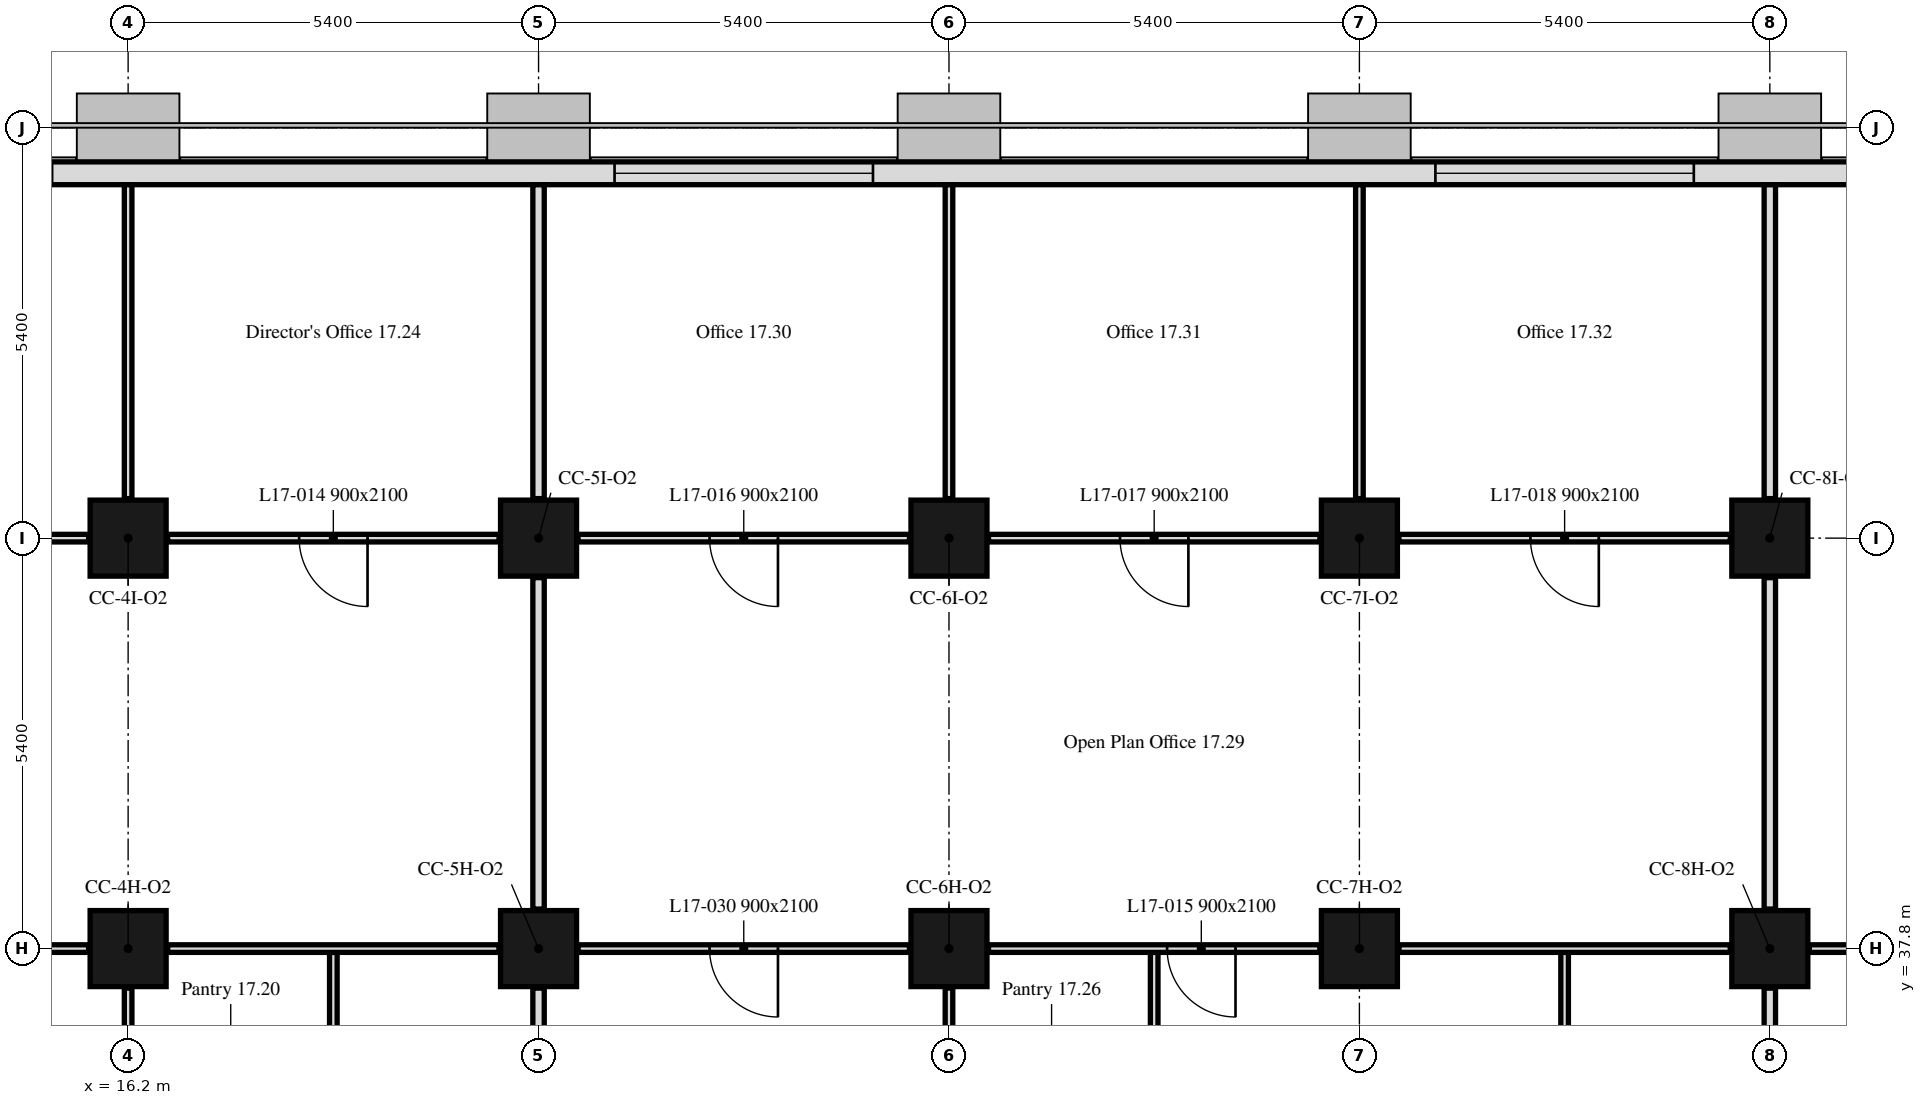
"""IFC4 building model, lengths in metres.
Left out: names, types, materials, properties, quantities, classifications, styles, units other than length and angle.
Written with IfcOpenShell. Run it as: python <this file> out.ifc"""

import sys

from ifc_helpers import new_model, si_unit, direction, frame, frame_2d, origin, origin_2d, place, context, subcontext, project, spatial, rectangle, extrude, element, fill, save


model = new_model("IFC4")
c1 = context("Model", 3, precision=1e-05, world=origin(), true_north=direction((0.0, 1.0)))
c2 = subcontext(c1, "Body", "Model", "MODEL_VIEW")
j1 = project(units=[si_unit("LENGTHUNIT", "METRE"), si_unit("PLANEANGLEUNIT", "RADIAN")], contexts=[c1])
p1 = place(None, origin())
s1 = spatial("IfcSite", under=j1, at=p1, CompositionType="ELEMENT")
p2 = place(p1, origin())
s2 = spatial("IfcBuilding", under=s1, at=p2, CompositionType="ELEMENT")
p3 = place(p2, frame((0.0, 0.0, 76.4)))
s3 = spatial("IfcBuildingStorey", under=s2, at=p3, CompositionType="ELEMENT", Elevation=76.4)
for number, where, z_axis, x_axis in (
    (1, (16.2, 37.8, 0.0), (0.0, 0.0, 1.0), (1.0, 0.0, 0.0)),
    (2, (21.6, 37.8, 0.0), (0.0, 0.0, 1.0), (1.0, 0.0, 0.0)),
    (3, (27.0, 37.8, 0.0), (0.0, 0.0, 1.0), (1.0, 0.0, 0.0)),
    (4, (32.4, 37.8, 0.0), (0.0, 0.0, 1.0), (1.0, 0.0, 0.0)),
    (5, (37.8, 37.8, 0.0), (0.0, 0.0, 1.0), (1.0, 0.0, 0.0)),
    (6, (16.2, 43.2, 0.0), (0.0, 0.0, 1.0), (1.0, 0.0, 0.0)),
    (7, (21.6, 43.2, 0.0), (0.0, 0.0, 1.0), (1.0, 0.0, 0.0)),
    (8, (27.0, 43.2, 0.0), (0.0, 0.0, 1.0), (1.0, 0.0, 0.0)),
    (9, (32.4, 43.2, 0.0), (0.0, 0.0, 1.0), (1.0, 0.0, 0.0)),
    (10, (37.8, 43.2, 0.0), (0.0, 0.0, 1.0), (1.0, 0.0, 0.0)),
):
    element("IfcColumn", number, at=place(p3, frame(where, z_axis=z_axis, x_axis=x_axis)), inside=s3, PredefinedType="COLUMN", context=c2, shape_type="SweptSolid", body=[
        extrude(rectangle(XDim=1.0, YDim=1.0, at=origin_2d()), origin(), (0.0, 0.0, 1.0), 3.5),
    ])
p4 = place(p3, frame((43.014, 48.0, 0.0), z_axis=(0.0, 0.0, 1.0), x_axis=(-1.0, 0.0, 0.0)))
e11 = element("IfcWall", 11, at=p4, inside=s3, PredefinedType="SOLIDWALL", context=c2, shape_type="SweptSolid", body=[
    extrude(rectangle(XDim=32.027, YDim=0.3, at=frame_2d((16.014, 0.0))), origin(), (0.0, 0.0, 1.0), 3.5),
])
p5 = place(p4, frame((6.214, 0.0, 0.9)))
e12 = element("IfcOpeningElement", 12, at=p5, cuts=e11, PredefinedType="OPENING", context=c2, shape_type="SweptSolid", body=[
    extrude(rectangle(XDim=3.4, YDim=1.7, at=frame_2d((1.7, 0.85))), frame((0.0, 0.16, 0.0), z_axis=(0.0, -1.0, 0.0), x_axis=(1.0, 0.0, 0.0)), (0.0, 0.0, 1.0), 0.32),
])
p6 = place(p4, frame((17.014, 0.0, 0.9)))
e13 = element("IfcOpeningElement", 13, at=p6, cuts=e11, PredefinedType="OPENING", context=c2, shape_type="SweptSolid", body=[
    extrude(rectangle(XDim=3.4, YDim=1.7, at=frame_2d((1.7, 0.85))), frame((0.0, 0.16, 0.0), z_axis=(0.0, -1.0, 0.0), x_axis=(1.0, 0.0, 0.0)), (0.0, 0.0, 1.0), 0.32),
])
p7 = place(p4, frame((27.814, 0.0, 0.9)))
e14 = element("IfcOpeningElement", 14, at=p7, cuts=e11, PredefinedType="OPENING", context=c2, shape_type="SweptSolid", body=[
    extrude(rectangle(XDim=3.4, YDim=1.7, at=frame_2d((1.7, 0.85))), frame((0.0, 0.16, 0.0), z_axis=(0.0, -1.0, 0.0), x_axis=(1.0, 0.0, 0.0)), (0.0, 0.0, 1.0), 0.32),
])
p8 = place(p3, frame((16.2, 35.175, 0.0), z_axis=(0.0, 0.0, 1.0), x_axis=(0.0, 1.0, 0.0)))
e15 = element("IfcWall", 15, at=p8, inside=s3, PredefinedType="PARTITIONING", context=c2, shape_type="SweptSolid", body=[
    extrude(rectangle(XDim=2.105, YDim=0.1, at=frame_2d((1.052, 0.0))), origin(), (0.0, 0.0, 1.0), 2.75),
])
p9 = place(p3, frame((15.68, 37.8, 0.0), z_axis=(0.0, 0.0, 1.0), x_axis=(-1.0, 0.0, 0.0)))
e16 = element("IfcWall", 16, at=p9, inside=s3, PredefinedType="PARTITIONING", context=c2, shape_type="SweptSolid", body=[
    extrude(rectangle(XDim=4.36, YDim=0.1, at=frame_2d((2.18, 0.0))), origin(), (0.0, 0.0, 1.0), 3.5),
])
p10 = place(p9, frame((1.73, 0.0, 0.0)))
e17 = element("IfcOpeningElement", 17, at=p10, cuts=e16, PredefinedType="OPENING", context=c2, shape_type="SweptSolid", body=[
    extrude(rectangle(XDim=0.9, YDim=2.1, at=frame_2d((0.45, 1.05))), frame((0.0, 0.05, 0.0), z_axis=(0.0, -1.0, 0.0), x_axis=(1.0, 0.0, 0.0)), (0.0, 0.0, 1.0), 0.1),
])
p11 = place(p3, frame((18.9, 35.175, 0.0), z_axis=(0.0, 0.0, 1.0), x_axis=(0.0, 1.0, 0.0)))
e18 = element("IfcWall", 18, at=p11, inside=s3, PredefinedType="PARTITIONING", context=c2, shape_type="SweptSolid", body=[
    extrude(rectangle(XDim=2.575, YDim=0.1, at=frame_2d((1.288, 0.0))), origin(), (0.0, 0.0, 1.0), 3.5),
])
p12 = place(p3, frame((21.6, 35.175, 0.0), z_axis=(0.0, 0.0, 1.0), x_axis=(0.0, 1.0, 0.0)))
e19 = element("IfcWall", 19, at=p12, inside=s3, PredefinedType="PARTITIONING", context=c2, shape_type="SweptSolid", body=[
    extrude(rectangle(XDim=2.105, YDim=0.15, at=frame_2d((1.052, 0.0))), origin(), (0.0, 0.0, 1.0), 2.75),
])
p13 = place(p3, frame((21.08, 37.8, 0.0), z_axis=(0.0, 0.0, 1.0), x_axis=(-1.0, 0.0, 0.0)))
e20 = element("IfcWall", 20, at=p13, inside=s3, PredefinedType="PARTITIONING", context=c2, shape_type="SweptSolid", body=[
    extrude(rectangle(XDim=4.36, YDim=0.1, at=frame_2d((2.18, 0.0))), origin(), (0.0, 0.0, 1.0), 3.5),
])
p14 = place(p3, frame((21.08, 43.2, 0.0), z_axis=(0.0, 0.0, 1.0), x_axis=(-1.0, 0.0, 0.0)))
e21 = element("IfcWall", 21, at=p14, inside=s3, PredefinedType="PARTITIONING", context=c2, shape_type="SweptSolid", body=[
    extrude(rectangle(XDim=4.36, YDim=0.1, at=frame_2d((2.18, 0.0))), origin(), (0.0, 0.0, 1.0), 3.5),
])
p15 = place(p14, frame((1.73, 0.0, 0.0)))
e22 = element("IfcOpeningElement", 22, at=p15, cuts=e21, PredefinedType="OPENING", context=c2, shape_type="SweptSolid", body=[
    extrude(rectangle(XDim=0.9, YDim=2.1, at=frame_2d((0.45, 1.05))), frame((0.0, 0.05, 0.0), z_axis=(0.0, -1.0, 0.0), x_axis=(1.0, 0.0, 0.0)), (0.0, 0.0, 1.0), 0.1),
])
p16 = place(p3, frame((15.68, 43.2, 0.0), z_axis=(0.0, 0.0, 1.0), x_axis=(-1.0, 0.0, 0.0)))
e23 = element("IfcWall", 23, at=p16, inside=s3, PredefinedType="PARTITIONING", context=c2, shape_type="SweptSolid", body=[
    extrude(rectangle(XDim=4.36, YDim=0.1, at=frame_2d((2.18, 0.0))), origin(), (0.0, 0.0, 1.0), 3.5),
])
p17 = place(p16, frame((1.73, 0.0, 0.0)))
e24 = element("IfcOpeningElement", 24, at=p17, cuts=e23, PredefinedType="OPENING", context=c2, shape_type="SweptSolid", body=[
    extrude(rectangle(XDim=0.9, YDim=2.1, at=frame_2d((0.45, 1.05))), frame((0.0, 0.05, 0.0), z_axis=(0.0, -1.0, 0.0), x_axis=(1.0, 0.0, 0.0)), (0.0, 0.0, 1.0), 0.1),
])
p18 = place(p3, frame((21.6, 38.32, 0.0), z_axis=(0.0, 0.0, 1.0), x_axis=(0.0, 1.0, 0.0)))
e25 = element("IfcWall", 25, at=p18, inside=s3, PredefinedType="PARTITIONING", context=c2, shape_type="SweptSolid", body=[
    extrude(rectangle(XDim=4.36, YDim=0.15, at=frame_2d((2.18, 0.0))), origin(), (0.0, 0.0, 1.0), 2.75),
])
p19 = place(p3, frame((16.2, 43.72, 0.0), z_axis=(0.0, 0.0, 1.0), x_axis=(0.0, 1.0, 0.0)))
e26 = element("IfcWall", 26, at=p19, inside=s3, PredefinedType="PARTITIONING", context=c2, shape_type="SweptSolid", body=[
    extrude(rectangle(XDim=4.129, YDim=0.1, at=frame_2d((2.064, 0.0))), origin(), (0.0, 0.0, 1.0), 2.75),
])
p20 = place(p3, frame((21.6, 43.72, 0.0), z_axis=(0.0, 0.0, 1.0), x_axis=(0.0, 1.0, 0.0)))
e27 = element("IfcWall", 27, at=p20, inside=s3, PredefinedType="PARTITIONING", context=c2, shape_type="SweptSolid", body=[
    extrude(rectangle(XDim=4.129, YDim=0.15, at=frame_2d((2.064, 0.0))), origin(), (0.0, 0.0, 1.0), 2.75),
])
p21 = place(p3, frame((27.0, 35.175, 0.0), z_axis=(0.0, 0.0, 1.0), x_axis=(0.0, 1.0, 0.0)))
e28 = element("IfcWall", 28, at=p21, inside=s3, PredefinedType="PARTITIONING", context=c2, shape_type="SweptSolid", body=[
    extrude(rectangle(XDim=2.105, YDim=0.1, at=frame_2d((1.052, 0.0))), origin(), (0.0, 0.0, 1.0), 2.75),
])
p22 = place(p3, frame((26.48, 37.8, 0.0), z_axis=(0.0, 0.0, 1.0), x_axis=(-1.0, 0.0, 0.0)))
e29 = element("IfcWall", 29, at=p22, inside=s3, PredefinedType="PARTITIONING", context=c2, shape_type="SweptSolid", body=[
    extrude(rectangle(XDim=4.36, YDim=0.1, at=frame_2d((2.18, 0.0))), origin(), (0.0, 0.0, 1.0), 3.5),
])
p23 = place(p22, frame((1.73, 0.0, 0.0)))
e30 = element("IfcOpeningElement", 30, at=p23, cuts=e29, PredefinedType="OPENING", context=c2, shape_type="SweptSolid", body=[
    extrude(rectangle(XDim=0.9, YDim=2.1, at=frame_2d((0.45, 1.05))), frame((0.0, 0.05, 0.0), z_axis=(0.0, -1.0, 0.0), x_axis=(1.0, 0.0, 0.0)), (0.0, 0.0, 1.0), 0.1),
])
for number, where, z_axis, x_axis in (
    (31, (29.7, 35.175, 0.0), (0.0, 0.0, 1.0), (0.0, 1.0, 0.0)),
    (32, (35.1, 35.175, 0.0), (0.0, 0.0, 1.0), (0.0, 1.0, 0.0)),
):
    element("IfcWall", number, at=place(p3, frame(where, z_axis=z_axis, x_axis=x_axis)), inside=s3, PredefinedType="PARTITIONING", context=c2, shape_type="SweptSolid", body=[
        extrude(rectangle(XDim=2.575, YDim=0.1, at=frame_2d((1.288, 0.0))), origin(), (0.0, 0.0, 1.0), 3.5),
    ])
p24 = place(p3, frame((31.88, 37.8, 0.0), z_axis=(0.0, 0.0, 1.0), x_axis=(-1.0, 0.0, 0.0)))
e33 = element("IfcWall", 33, at=p24, inside=s3, PredefinedType="PARTITIONING", context=c2, shape_type="SweptSolid", body=[
    extrude(rectangle(XDim=4.36, YDim=0.1, at=frame_2d((2.18, 0.0))), origin(), (0.0, 0.0, 1.0), 3.5),
])
p25 = place(p24, frame((1.11, 0.0, 0.0)))
e34 = element("IfcOpeningElement", 34, at=p25, cuts=e33, PredefinedType="OPENING", context=c2, shape_type="SweptSolid", body=[
    extrude(rectangle(XDim=0.9, YDim=2.1, at=frame_2d((0.45, 1.05))), frame((0.0, 0.05, 0.0), z_axis=(0.0, -1.0, 0.0), x_axis=(1.0, 0.0, 0.0)), (0.0, 0.0, 1.0), 0.1),
])
p26 = place(p3, frame((37.8, 35.175, 0.0), z_axis=(0.0, 0.0, 1.0), x_axis=(0.0, 1.0, 0.0)))
e35 = element("IfcWall", 35, at=p26, inside=s3, PredefinedType="PARTITIONING", context=c2, shape_type="SweptSolid", body=[
    extrude(rectangle(XDim=2.105, YDim=0.15, at=frame_2d((1.052, 0.0))), origin(), (0.0, 0.0, 1.0), 2.75),
])
p27 = place(p3, frame((37.28, 37.8, 0.0), z_axis=(0.0, 0.0, 1.0), x_axis=(-1.0, 0.0, 0.0)))
e36 = element("IfcWall", 36, at=p27, inside=s3, PredefinedType="PARTITIONING", context=c2, shape_type="SweptSolid", body=[
    extrude(rectangle(XDim=4.36, YDim=0.1, at=frame_2d((2.18, 0.0))), origin(), (0.0, 0.0, 1.0), 2.75),
])
p28 = place(p3, frame((37.8, 38.32, 0.0), z_axis=(0.0, 0.0, 1.0), x_axis=(0.0, 1.0, 0.0)))
e37 = element("IfcWall", 37, at=p28, inside=s3, PredefinedType="PARTITIONING", context=c2, shape_type="SweptSolid", body=[
    extrude(rectangle(XDim=4.36, YDim=0.15, at=frame_2d((2.18, 0.0))), origin(), (0.0, 0.0, 1.0), 2.75),
])
p29 = place(p3, frame((37.28, 43.2, 0.0), z_axis=(0.0, 0.0, 1.0), x_axis=(-1.0, 0.0, 0.0)))
e38 = element("IfcWall", 38, at=p29, inside=s3, PredefinedType="PARTITIONING", context=c2, shape_type="SweptSolid", body=[
    extrude(rectangle(XDim=4.36, YDim=0.1, at=frame_2d((2.18, 0.0))), origin(), (0.0, 0.0, 1.0), 3.5),
])
p30 = place(p29, frame((1.73, 0.0, 0.0)))
e39 = element("IfcOpeningElement", 39, at=p30, cuts=e38, PredefinedType="OPENING", context=c2, shape_type="SweptSolid", body=[
    extrude(rectangle(XDim=0.9, YDim=2.1, at=frame_2d((0.45, 1.05))), frame((0.0, 0.05, 0.0), z_axis=(0.0, -1.0, 0.0), x_axis=(1.0, 0.0, 0.0)), (0.0, 0.0, 1.0), 0.1),
])
p31 = place(p3, frame((31.88, 43.2, 0.0), z_axis=(0.0, 0.0, 1.0), x_axis=(-1.0, 0.0, 0.0)))
e40 = element("IfcWall", 40, at=p31, inside=s3, PredefinedType="PARTITIONING", context=c2, shape_type="SweptSolid", body=[
    extrude(rectangle(XDim=4.36, YDim=0.1, at=frame_2d((2.18, 0.0))), origin(), (0.0, 0.0, 1.0), 3.5),
])
p32 = place(p31, frame((1.73, 0.0, 0.0)))
e41 = element("IfcOpeningElement", 41, at=p32, cuts=e40, PredefinedType="OPENING", context=c2, shape_type="SweptSolid", body=[
    extrude(rectangle(XDim=0.9, YDim=2.1, at=frame_2d((0.45, 1.05))), frame((0.0, 0.05, 0.0), z_axis=(0.0, -1.0, 0.0), x_axis=(1.0, 0.0, 0.0)), (0.0, 0.0, 1.0), 0.1),
])
p33 = place(p3, frame((26.48, 43.2, 0.0), z_axis=(0.0, 0.0, 1.0), x_axis=(-1.0, 0.0, 0.0)))
e42 = element("IfcWall", 42, at=p33, inside=s3, PredefinedType="PARTITIONING", context=c2, shape_type="SweptSolid", body=[
    extrude(rectangle(XDim=4.36, YDim=0.1, at=frame_2d((2.18, 0.0))), origin(), (0.0, 0.0, 1.0), 3.5),
])
p34 = place(p33, frame((1.73, 0.0, 0.0)))
e43 = element("IfcOpeningElement", 43, at=p34, cuts=e42, PredefinedType="OPENING", context=c2, shape_type="SweptSolid", body=[
    extrude(rectangle(XDim=0.9, YDim=2.1, at=frame_2d((0.45, 1.05))), frame((0.0, 0.05, 0.0), z_axis=(0.0, -1.0, 0.0), x_axis=(1.0, 0.0, 0.0)), (0.0, 0.0, 1.0), 0.1),
])
for number, where, z_axis, x_axis in (
    (44, (27.0, 43.72, 0.0), (0.0, 0.0, 1.0), (0.0, 1.0, 0.0)),
    (45, (32.4, 43.72, 0.0), (0.0, 0.0, 1.0), (0.0, 1.0, 0.0)),
):
    element("IfcWall", number, at=place(p3, frame(where, z_axis=z_axis, x_axis=x_axis)), inside=s3, PredefinedType="PARTITIONING", context=c2, shape_type="SweptSolid", body=[
        extrude(rectangle(XDim=4.129, YDim=0.1, at=frame_2d((2.064, 0.0))), origin(), (0.0, 0.0, 1.0), 2.75),
    ])
p35 = place(p3, frame((37.8, 43.72, 0.0), z_axis=(0.0, 0.0, 1.0), x_axis=(0.0, 1.0, 0.0)))
e46 = element("IfcWall", 46, at=p35, inside=s3, PredefinedType="PARTITIONING", context=c2, shape_type="SweptSolid", body=[
    extrude(rectangle(XDim=4.129, YDim=0.15, at=frame_2d((2.064, 0.0))), origin(), (0.0, 0.0, 1.0), 2.75),
])
p36 = place(p3, frame((42.68, 37.8, 0.0), z_axis=(0.0, 0.0, 1.0), x_axis=(-1.0, 0.0, 0.0)))
e47 = element("IfcWall", 47, at=p36, inside=s3, PredefinedType="PARTITIONING", context=c2, shape_type="SweptSolid", body=[
    extrude(rectangle(XDim=4.36, YDim=0.1, at=frame_2d((2.18, 0.0))), origin(), (0.0, 0.0, 1.0), 2.75),
])
p37 = place(p36, frame((1.73, 0.0, 0.0)))
e48 = element("IfcOpeningElement", 48, at=p37, cuts=e47, PredefinedType="OPENING", context=c2, shape_type="SweptSolid", body=[
    extrude(rectangle(XDim=0.9, YDim=2.1, at=frame_2d((0.45, 1.05))), frame((0.0, 0.05, 0.0), z_axis=(0.0, -1.0, 0.0), x_axis=(1.0, 0.0, 0.0)), (0.0, 0.0, 1.0), 0.1),
])
p38 = place(p5, origin())
e49 = element("IfcWindow", 49, at=p38, inside=s3, PartitioningType="SINGLE_PANEL", PredefinedType="WINDOW", context=c2, shape_type="SweptSolid", body=[
    extrude(rectangle(XDim=3.4, YDim=1.7, at=frame_2d((1.7, 0.85))), frame((0.0, 0.03, 0.0), z_axis=(0.0, -1.0, 0.0), x_axis=(1.0, 0.0, 0.0)), (0.0, 0.0, 1.0), 0.06),
])
fill(e12, e49)
p39 = place(p6, origin())
e50 = element("IfcWindow", 50, at=p39, inside=s3, PartitioningType="SINGLE_PANEL", PredefinedType="WINDOW", context=c2, shape_type="SweptSolid", body=[
    extrude(rectangle(XDim=3.4, YDim=1.7, at=frame_2d((1.7, 0.85))), frame((0.0, 0.03, 0.0), z_axis=(0.0, -1.0, 0.0), x_axis=(1.0, 0.0, 0.0)), (0.0, 0.0, 1.0), 0.06),
])
fill(e13, e50)
p40 = place(p15, origin())
e51 = element("IfcDoor", 51, at=p40, inside=s3, OperationType="SINGLE_SWING_LEFT", PredefinedType="DOOR", context=c2, shape_type="SweptSolid", body=[
    extrude(rectangle(XDim=0.9, YDim=2.1, at=frame_2d((0.45, 1.05))), frame((0.0, 0.025, 0.0), z_axis=(0.0, -1.0, 0.0), x_axis=(1.0, 0.0, 0.0)), (0.0, 0.0, 1.0), 0.05),
])
fill(e22, e51)
p41 = place(p25, origin())
e52 = element("IfcDoor", 52, at=p41, inside=s3, OperationType="SINGLE_SWING_RIGHT", PredefinedType="DOOR", context=c2, shape_type="SweptSolid", body=[
    extrude(rectangle(XDim=0.9, YDim=2.1, at=frame_2d((0.45, 1.05))), frame((0.0, 0.025, 0.0), z_axis=(0.0, -1.0, 0.0), x_axis=(1.0, 0.0, 0.0)), (0.0, 0.0, 1.0), 0.05),
])
fill(e34, e52)
p42 = place(p34, origin())
e53 = element("IfcDoor", 53, at=p42, inside=s3, OperationType="SINGLE_SWING_RIGHT", PredefinedType="DOOR", context=c2, shape_type="SweptSolid", body=[
    extrude(rectangle(XDim=0.9, YDim=2.1, at=frame_2d((0.45, 1.05))), frame((0.0, 0.025, 0.0), z_axis=(0.0, -1.0, 0.0), x_axis=(1.0, 0.0, 0.0)), (0.0, 0.0, 1.0), 0.05),
])
fill(e43, e53)
p43 = place(p32, origin())
e54 = element("IfcDoor", 54, at=p43, inside=s3, OperationType="SINGLE_SWING_RIGHT", PredefinedType="DOOR", context=c2, shape_type="SweptSolid", body=[
    extrude(rectangle(XDim=0.9, YDim=2.1, at=frame_2d((0.45, 1.05))), frame((0.0, 0.025, 0.0), z_axis=(0.0, -1.0, 0.0), x_axis=(1.0, 0.0, 0.0)), (0.0, 0.0, 1.0), 0.05),
])
fill(e41, e54)
p44 = place(p30, origin())
e55 = element("IfcDoor", 55, at=p44, inside=s3, OperationType="SINGLE_SWING_RIGHT", PredefinedType="DOOR", context=c2, shape_type="SweptSolid", body=[
    extrude(rectangle(XDim=0.9, YDim=2.1, at=frame_2d((0.45, 1.05))), frame((0.0, 0.025, 0.0), z_axis=(0.0, -1.0, 0.0), x_axis=(1.0, 0.0, 0.0)), (0.0, 0.0, 1.0), 0.05),
])
fill(e39, e55)
p45 = place(p23, origin())
e56 = element("IfcDoor", 56, at=p45, inside=s3, OperationType="SINGLE_SWING_LEFT", PredefinedType="DOOR", context=c2, shape_type="SweptSolid", body=[
    extrude(rectangle(XDim=0.9, YDim=2.1, at=frame_2d((0.45, 1.05))), frame((0.0, 0.025, 0.0), z_axis=(0.0, -1.0, 0.0), x_axis=(1.0, 0.0, 0.0)), (0.0, 0.0, 1.0), 0.05),
])
fill(e30, e56)
save(model, sys.argv[1])
